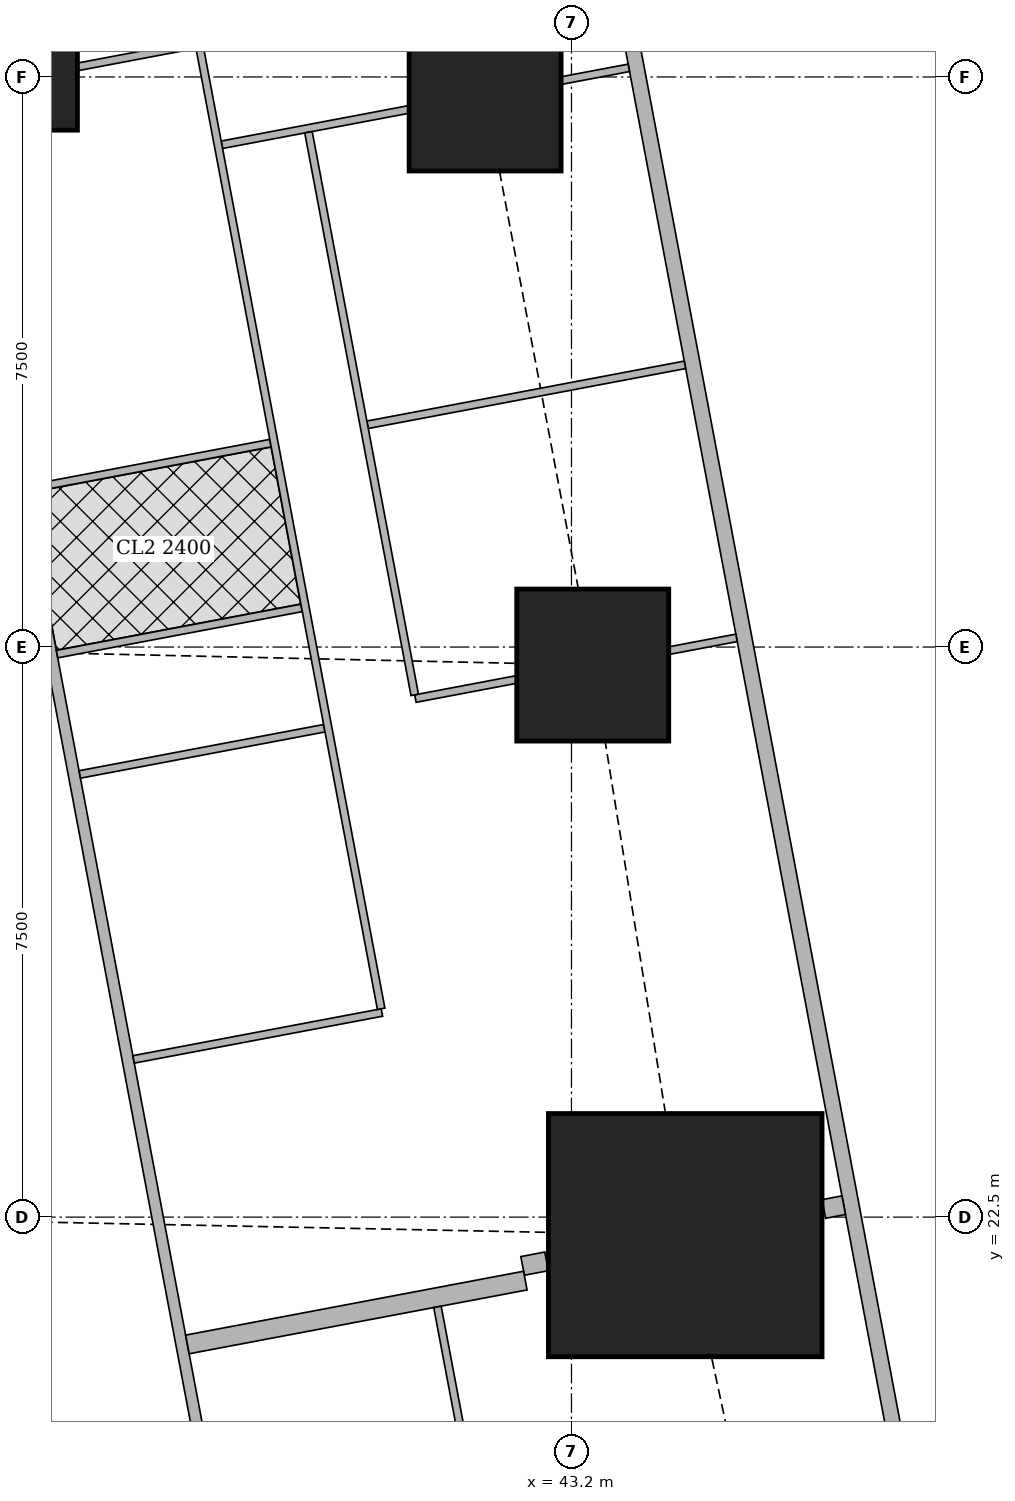
"""IFC4 building model, lengths in metres.
Left out: names, types, materials, properties, quantities, classifications, styles, units other than length and angle.
Written with IfcOpenShell. Run it as: python <this file> out.ifc"""

import sys

from ifc_helpers import new_model, si_unit, direction, frame, frame_2d, origin, origin_2d, place, context, subcontext, project, spatial, rectangle, extrude, element, fill, save


model = new_model("IFC4")
c1 = context("Model", 3, precision=1e-05, world=origin(), true_north=direction((0.0, 1.0)))
c2 = subcontext(c1, "Body", "Model", "MODEL_VIEW")
j1 = project(units=[si_unit("LENGTHUNIT", "METRE"), si_unit("PLANEANGLEUNIT", "RADIAN")], contexts=[c1])
p1 = place(None, origin())
s1 = spatial("IfcSite", under=j1, at=p1, CompositionType="ELEMENT")
p2 = place(p1, origin())
s2 = spatial("IfcBuilding", under=s1, at=p2, CompositionType="ELEMENT")
p3 = place(p2, frame((0.0, 0.0, 285.35)))
s3 = spatial("IfcBuildingStorey", under=s2, at=p3, CompositionType="ELEMENT", Elevation=285.35)
p4 = place(p3, frame((44.697, 22.263, 0.0), z_axis=(0.0, 0.0, 1.0), x_axis=(1.0, 0.0, 0.0)))
e1 = element("IfcColumn", 1, at=p4, inside=s3, PredefinedType="COLUMN", context=c2, shape_type="SweptSolid", body=[
    extrude(rectangle(XDim=3.6, YDim=3.2, at=origin_2d()), origin(), (0.0, 0.0, 1.0), 3.75),
])
p5 = place(p3, frame((43.48, 29.763, 0.0), z_axis=(0.0, 0.0, 1.0), x_axis=(1.0, 0.0, 0.0)))
e2 = element("IfcColumn", 2, at=p5, inside=s3, PredefinedType="COLUMN", context=c2, shape_type="SweptSolid", body=[
    extrude(rectangle(XDim=2.0, YDim=2.0, at=origin_2d()), origin(), (0.0, 0.0, 1.0), 3.75),
])
p6 = place(p3, frame((36.0, 37.5, 0.0), z_axis=(0.0, 0.0, 1.0), x_axis=(1.0, 0.0, 0.0)))
e3 = element("IfcColumn", 3, at=p6, inside=s3, PredefinedType="COLUMN", context=c2, shape_type="SweptSolid", body=[
    extrude(rectangle(XDim=1.4, YDim=1.4, at=origin_2d()), origin(), (0.0, 0.0, 1.0), 3.75),
])
p7 = place(p3, frame((42.064, 37.263, 0.0), z_axis=(0.0, 0.0, 1.0), x_axis=(1.0, 0.0, 0.0)))
e4 = element("IfcColumn", 4, at=p7, inside=s3, PredefinedType="COLUMN", context=c2, shape_type="SweptSolid", body=[
    extrude(rectangle(XDim=2.0, YDim=2.0, at=origin_2d()), origin(), (0.0, 0.0, 1.0), 3.75),
])
p8 = place(p3, frame((49.684, 7.832, 0.0), z_axis=(0.0, 0.0, 1.0), x_axis=(-0.185616669694, 0.982622232565, 0.0)))
e5 = element("IfcWall", 5, at=p8, inside=s3, PredefinedType="SOLIDWALL", context=c2, shape_type="SweptSolid", body=[
    extrude(rectangle(XDim=36.0, YDim=0.2, at=frame_2d((18.0, 0.0))), origin(), (0.0, 0.0, 1.0), 3.5),
])
p9 = place(p8, frame((2.518, 0.0, 0.9)))
e6 = element("IfcOpeningElement", 6, at=p9, cuts=e5, PredefinedType="OPENING", context=c2, shape_type="SweptSolid", body=[
    extrude(rectangle(XDim=2.4, YDim=1.5, at=frame_2d((1.2, 0.75))), frame((0.0, 0.11, 0.0), z_axis=(0.0, -1.0, 0.0), x_axis=(1.0, 0.0, 0.0)), (0.0, 0.0, 1.0), 0.22),
])
p10 = place(p8, frame((8.444, 0.0, 0.9)))
e7 = element("IfcOpeningElement", 7, at=p10, cuts=e5, PredefinedType="OPENING", context=c2, shape_type="SweptSolid", body=[
    extrude(rectangle(XDim=1.8, YDim=1.5, at=frame_2d((0.9, 0.75))), frame((0.0, 0.11, 0.0), z_axis=(0.0, -1.0, 0.0), x_axis=(1.0, 0.0, 0.0)), (0.0, 0.0, 1.0), 0.22),
])
p11 = place(p8, frame((12.261, 0.0, 0.9)))
e8 = element("IfcOpeningElement", 8, at=p11, cuts=e5, PredefinedType="OPENING", context=c2, shape_type="SweptSolid", body=[
    extrude(rectangle(XDim=1.8, YDim=1.5, at=frame_2d((0.9, 0.75))), frame((0.0, 0.11, 0.0), z_axis=(0.0, -1.0, 0.0), x_axis=(1.0, 0.0, 0.0)), (0.0, 0.0, 1.0), 0.22),
])
p12 = place(p8, frame((16.078, 0.0, 0.9)))
e9 = element("IfcOpeningElement", 9, at=p12, cuts=e5, PredefinedType="OPENING", context=c2, shape_type="SweptSolid", body=[
    extrude(rectangle(XDim=1.8, YDim=1.5, at=frame_2d((0.9, 0.75))), frame((0.0, 0.11, 0.0), z_axis=(0.0, -1.0, 0.0), x_axis=(1.0, 0.0, 0.0)), (0.0, 0.0, 1.0), 0.22),
])
p13 = place(p8, frame((19.894, 0.0, 0.9)))
e10 = element("IfcOpeningElement", 10, at=p13, cuts=e5, PredefinedType="OPENING", context=c2, shape_type="SweptSolid", body=[
    extrude(rectangle(XDim=1.8, YDim=1.5, at=frame_2d((0.9, 0.75))), frame((0.0, 0.11, 0.0), z_axis=(0.0, -1.0, 0.0), x_axis=(1.0, 0.0, 0.0)), (0.0, 0.0, 1.0), 0.22),
])
p14 = place(p8, frame((23.71, 0.0, 0.9)))
e11 = element("IfcOpeningElement", 11, at=p14, cuts=e5, PredefinedType="OPENING", context=c2, shape_type="SweptSolid", body=[
    extrude(rectangle(XDim=1.8, YDim=1.5, at=frame_2d((0.9, 0.75))), frame((0.0, 0.11, 0.0), z_axis=(0.0, -1.0, 0.0), x_axis=(1.0, 0.0, 0.0)), (0.0, 0.0, 1.0), 0.22),
])
p15 = place(p8, frame((27.526, 0.0, 0.9)))
e12 = element("IfcOpeningElement", 12, at=p15, cuts=e5, PredefinedType="OPENING", context=c2, shape_type="SweptSolid", body=[
    extrude(rectangle(XDim=1.8, YDim=1.5, at=frame_2d((0.9, 0.75))), frame((0.0, 0.11, 0.0), z_axis=(0.0, -1.0, 0.0), x_axis=(1.0, 0.0, 0.0)), (0.0, 0.0, 1.0), 0.22),
])
p16 = place(p8, frame((32.046, 0.0, 0.9)))
e13 = element("IfcOpeningElement", 13, at=p16, cuts=e5, PredefinedType="OPENING", context=c2, shape_type="SweptSolid", body=[
    extrude(rectangle(XDim=1.8, YDim=1.5, at=frame_2d((0.9, 0.75))), frame((0.0, 0.11, 0.0), z_axis=(0.0, -1.0, 0.0), x_axis=(1.0, 0.0, 0.0)), (0.0, 0.0, 1.0), 0.22),
])
p17 = place(p3, frame((34.036, 42.186, 0.0), z_axis=(0.0, 0.0, 1.0), x_axis=(0.185593518645, -0.9826266055, 0.0)))
e14 = element("IfcWall", 14, at=p17, inside=s3, PredefinedType="SOLIDWALL", context=c2, shape_type="SweptSolid", body=[
    extrude(rectangle(XDim=35.961, YDim=0.15, at=frame_2d((17.98, 0.0))), origin(), (0.0, 0.0, 1.0), 2.5),
])
p18 = place(p17, frame((19.345, 0.0, 0.0)))
e15 = element("IfcOpeningElement", 15, at=p18, cuts=e14, PredefinedType="OPENING", context=c2, shape_type="SweptSolid", body=[
    extrude(rectangle(XDim=1.0, YDim=2.1, at=frame_2d((0.5, 1.05))), frame((0.0, 0.085, 0.0), z_axis=(0.0, -1.0, 0.0), x_axis=(1.0, 0.0, 0.0)), (0.0, 0.0, 1.0), 0.17),
])
p19 = place(p17, frame((33.774, 0.0, 0.0)))
e16 = element("IfcOpeningElement", 16, at=p19, cuts=e14, PredefinedType="OPENING", context=c2, shape_type="SweptSolid", body=[
    extrude(rectangle(XDim=1.0, YDim=2.1, at=frame_2d((0.5, 1.05))), frame((0.0, 0.085, 0.0), z_axis=(0.0, -1.0, 0.0), x_axis=(1.0, 0.0, 0.0)), (0.0, 0.0, 1.0), 0.17),
])
p20 = place(p3, frame((43.955, 37.62, 0.0), z_axis=(0.0, 0.0, 1.0), x_axis=(-0.982708424405, -0.18515980288, 0.0)))
e17 = element("IfcWall", 17, at=p20, inside=s3, PredefinedType="PARTITIONING", context=c2, shape_type="SweptSolid", body=[
    extrude(rectangle(XDim=0.897, YDim=0.1, at=frame_2d((0.448, 0.0))), origin(), (0.0, 0.0, 1.0), 3.5),
])
p21 = place(p3, frame((41.054, 37.072, 0.0), z_axis=(0.0, 0.0, 1.0), x_axis=(-0.982579896219, -0.185840650951, 0.0)))
e18 = element("IfcWall", 18, at=p21, inside=s3, PredefinedType="PARTITIONING", context=c2, shape_type="SweptSolid", body=[
    extrude(rectangle(XDim=2.497, YDim=0.1, at=frame_2d((1.249, 0.0))), origin(), (0.0, 0.0, 1.0), 3.5),
])
p22 = place(p21, frame((1.447, 0.0, 0.0)))
e19 = element("IfcOpeningElement", 19, at=p22, cuts=e18, PredefinedType="OPENING", context=c2, shape_type="SweptSolid", body=[
    extrude(rectangle(XDim=0.9, YDim=2.1, at=frame_2d((0.45, 1.05))), frame((0.0, 0.06, 0.0), z_axis=(0.0, -1.0, 0.0), x_axis=(1.0, 0.0, 0.0)), (0.0, 0.0, 1.0), 0.12),
])
p23 = place(p3, frame((44.693, 33.713, 0.0), z_axis=(0.0, 0.0, 1.0), x_axis=(-0.982623519589, -0.185609856287, 0.0)))
e20 = element("IfcWall", 20, at=p23, inside=s3, PredefinedType="PARTITIONING", context=c2, shape_type="SweptSolid", body=[
    extrude(rectangle(XDim=4.25, YDim=0.1, at=frame_2d((2.125, 0.0))), origin(), (0.0, 0.0, 1.0), 2.5),
])
p24 = place(p3, frame((45.372, 30.121, 0.0), z_axis=(0.0, 0.0, 1.0), x_axis=(-0.982547416156, -0.186012297994, 0.0)))
e21 = element("IfcWall", 21, at=p24, inside=s3, PredefinedType="PARTITIONING", context=c2, shape_type="SweptSolid", body=[
    extrude(rectangle(XDim=0.898, YDim=0.1, at=frame_2d((0.449, 0.0))), origin(), (0.0, 0.0, 1.0), 3.5),
])
p25 = place(p3, frame((42.47, 29.572, 0.0), z_axis=(0.0, 0.0, 1.0), x_axis=(-0.982610503289, -0.185678751683, 0.0)))
e22 = element("IfcWall", 22, at=p25, inside=s3, PredefinedType="PARTITIONING", context=c2, shape_type="SweptSolid", body=[
    extrude(rectangle(XDim=1.346, YDim=0.1, at=frame_2d((0.673, 0.0))), origin(), (0.0, 0.0, 1.0), 2.5),
])
p26 = place(p3, frame((38.25, 37.925, 0.0), z_axis=(0.0, 0.0, 1.0), x_axis=(-0.982610209589, -0.185680305934, 0.0)))
e23 = element("IfcWall", 23, at=p26, inside=s3, PredefinedType="PARTITIONING", context=c2, shape_type="SweptSolid", body=[
    extrude(rectangle(XDim=1.567, YDim=0.1, at=frame_2d((0.784, 0.0))), origin(), (0.0, 0.0, 1.0), 3.5),
])
p27 = place(p3, frame((39.24, 32.683, 0.0), z_axis=(0.0, 0.0, 1.0), x_axis=(-0.982607026909, -0.185697147715, 0.0)))
e24 = element("IfcWall", 24, at=p27, inside=s3, PredefinedType="PARTITIONING", context=c2, shape_type="SweptSolid", body=[
    extrude(rectangle(XDim=3.275, YDim=0.1, at=frame_2d((1.637, 0.0))), origin(), (0.0, 0.0, 1.0), 3.5),
])
p28 = place(p3, frame((39.948, 28.932, 0.0), z_axis=(0.0, 0.0, 1.0), x_axis=(-0.982610347627, -0.185679575441, 0.0)))
e25 = element("IfcWall", 25, at=p28, inside=s3, PredefinedType="PARTITIONING", context=c2, shape_type="SweptSolid", body=[
    extrude(rectangle(XDim=3.274, YDim=0.1, at=frame_2d((1.637, 0.0))), origin(), (0.0, 0.0, 1.0), 3.5),
])
p29 = place(p3, frame((40.706, 25.192, 0.0), z_axis=(0.0, 0.0, 1.0), x_axis=(-0.982633623707, -0.185556356831, 0.0)))
e26 = element("IfcWall", 26, at=p29, inside=s3, PredefinedType="PARTITIONING", context=c2, shape_type="SweptSolid", body=[
    extrude(rectangle(XDim=3.325, YDim=0.1, at=frame_2d((1.663, 0.0))), origin(), (0.0, 0.0, 1.0), 3.5),
])
p30 = place(p3, frame((39.649, 30.515, 0.0), z_axis=(0.0, 0.0, 1.0), x_axis=(-0.982610347627, -0.185679575441, 0.0)))
e27 = element("IfcWall", 27, at=p30, inside=s3, PredefinedType="PARTITIONING", context=c2, shape_type="SweptSolid", body=[
    extrude(rectangle(XDim=3.274, YDim=0.1, at=frame_2d((1.637, 0.0))), origin(), (0.0, 0.0, 1.0), 2.5),
])
p31 = place(p3, frame((37.591, 41.685, 0.0), z_axis=(0.0, 0.0, 1.0), x_axis=(0.185541820726, -0.982636368532, 0.0)))
e28 = element("IfcWall", 28, at=p31, inside=s3, PredefinedType="PARTITIONING", context=c2, shape_type="SweptSolid", body=[
    extrude(rectangle(XDim=16.735, YDim=0.1, at=frame_2d((8.367, 0.0))), origin(), (0.0, 0.0, 1.0), 2.5),
])
p32 = place(p31, frame((2.413, 0.0, 0.0)))
e29 = element("IfcOpeningElement", 29, at=p32, cuts=e28, PredefinedType="OPENING", context=c2, shape_type="SweptSolid", body=[
    extrude(rectangle(XDim=0.9, YDim=2.1, at=frame_2d((0.45, 1.05))), frame((0.0, 0.06, 0.0), z_axis=(0.0, -1.0, 0.0), x_axis=(1.0, 0.0, 0.0)), (0.0, 0.0, 1.0), 0.12),
])
p33 = place(p31, frame((6.713, 0.0, 0.0)))
e30 = element("IfcOpeningElement", 30, at=p33, cuts=e28, PredefinedType="OPENING", context=c2, shape_type="SweptSolid", body=[
    extrude(rectangle(XDim=0.9, YDim=2.1, at=frame_2d((0.45, 1.05))), frame((0.0, 0.06, 0.0), z_axis=(0.0, -1.0, 0.0), x_axis=(1.0, 0.0, 0.0)), (0.0, 0.0, 1.0), 0.12),
])
p34 = place(p31, frame((9.805, 0.0, 0.0)))
e31 = element("IfcOpeningElement", 31, at=p34, cuts=e28, PredefinedType="OPENING", context=c2, shape_type="SweptSolid", body=[
    extrude(rectangle(XDim=0.9, YDim=2.1, at=frame_2d((0.45, 1.05))), frame((0.0, 0.06, 0.0), z_axis=(0.0, -1.0, 0.0), x_axis=(1.0, 0.0, 0.0)), (0.0, 0.0, 1.0), 0.12),
])
p35 = place(p31, frame((11.713, 0.0, 0.0)))
e32 = element("IfcOpeningElement", 32, at=p35, cuts=e28, PredefinedType="OPENING", context=c2, shape_type="SweptSolid", body=[
    extrude(rectangle(XDim=0.9, YDim=2.1, at=frame_2d((0.45, 1.05))), frame((0.0, 0.06, 0.0), z_axis=(0.0, -1.0, 0.0), x_axis=(1.0, 0.0, 0.0)), (0.0, 0.0, 1.0), 0.12),
])
p36 = place(p31, frame((14.426, 0.0, 0.0)))
e33 = element("IfcOpeningElement", 33, at=p36, cuts=e28, PredefinedType="OPENING", context=c2, shape_type="SweptSolid", body=[
    extrude(rectangle(XDim=0.9, YDim=2.1, at=frame_2d((0.45, 1.05))), frame((0.0, 0.06, 0.0), z_axis=(0.0, -1.0, 0.0), x_axis=(1.0, 0.0, 0.0)), (0.0, 0.0, 1.0), 0.12),
])
p37 = place(p3, frame((39.74, 36.773, 0.0), z_axis=(0.0, 0.0, 1.0), x_axis=(0.185583825641, -0.982628436216, 0.0)))
e34 = element("IfcWall", 34, at=p37, inside=s3, PredefinedType="PARTITIONING", context=c2, shape_type="SweptSolid", body=[
    extrude(rectangle(XDim=7.533, YDim=0.1, at=frame_2d((3.766, 0.0))), origin(), (0.0, 0.0, 1.0), 2.5),
])
p38 = place(p37, frame((2.726, 0.0, 0.0)))
e35 = element("IfcOpeningElement", 35, at=p38, cuts=e34, PredefinedType="OPENING", context=c2, shape_type="SweptSolid", body=[
    extrude(rectangle(XDim=0.9, YDim=2.1, at=frame_2d((0.45, 1.05))), frame((0.0, 0.06, 0.0), z_axis=(0.0, -1.0, 0.0), x_axis=(1.0, 0.0, 0.0)), (0.0, 0.0, 1.0), 0.12),
])
p39 = place(p37, frame((6.383, 0.0, 0.0)))
e36 = element("IfcOpeningElement", 36, at=p39, cuts=e34, PredefinedType="OPENING", context=c2, shape_type="SweptSolid", body=[
    extrude(rectangle(XDim=0.9, YDim=2.1, at=frame_2d((0.45, 1.05))), frame((0.0, 0.06, 0.0), z_axis=(0.0, -1.0, 0.0), x_axis=(1.0, 0.0, 0.0)), (0.0, 0.0, 1.0), 0.12),
])
p40 = place(p3, frame((46.782, 22.657, 0.0), z_axis=(0.0, 0.0, 1.0), x_axis=(-0.982104607121, -0.188336243648, 0.0)))
e37 = element("IfcWall", 37, at=p40, inside=s3, PredefinedType="SOLIDWALL", context=c2, shape_type="SweptSolid", body=[
    extrude(rectangle(XDim=0.266, YDim=0.25, at=frame_2d((0.133, 0.0))), origin(), (0.0, 0.0, 1.0), 3.5),
])
p41 = place(p3, frame((42.873, 21.918, 0.0), z_axis=(0.0, 0.0, 1.0), x_axis=(-0.982431406936, -0.186624035603, 0.0)))
e38 = element("IfcWall", 38, at=p41, inside=s3, PredefinedType="SOLIDWALL", context=c2, shape_type="SweptSolid", body=[
    extrude(rectangle(XDim=0.322, YDim=0.25, at=frame_2d((0.161, 0.0))), origin(), (0.0, 0.0, 1.0), 2.5),
])
p42 = place(p3, frame((42.593, 21.665, 0.0), z_axis=(0.0, 0.0, 1.0), x_axis=(-0.982612837616, -0.185666398014, 0.0)))
e39 = element("IfcWall", 39, at=p42, inside=s3, PredefinedType="SOLIDWALL", context=c2, shape_type="SweptSolid", body=[
    extrude(rectangle(XDim=4.525, YDim=0.25, at=frame_2d((2.262, 0.0))), origin(), (0.0, 0.0, 1.0), 2.5),
])
p43 = place(p3, frame((41.437, 21.319, 0.0), z_axis=(0.0, 0.0, 1.0), x_axis=(0.185742368638, -0.982598479794, 0.0)))
e40 = element("IfcWall", 40, at=p43, inside=s3, PredefinedType="PARTITIONING", context=c2, shape_type="SweptSolid", body=[
    extrude(rectangle(XDim=5.718, YDim=0.1, at=frame_2d((2.859, 0.0))), origin(), (0.0, 0.0, 1.0), 3.5),
])
p44 = place(p43, frame((1.333, 0.0, 0.0)))
e41 = element("IfcOpeningElement", 41, at=p44, cuts=e40, PredefinedType="OPENING", context=c2, shape_type="SweptSolid", body=[
    extrude(rectangle(XDim=0.9, YDim=2.1, at=frame_2d((0.45, 1.05))), frame((0.0, 0.06, 0.0), z_axis=(0.0, -1.0, 0.0), x_axis=(1.0, 0.0, 0.0)), (0.0, 0.0, 1.0), 0.12),
])
p45 = place(p43, frame((4.664, 0.0, 0.0)))
e42 = element("IfcOpeningElement", 42, at=p45, cuts=e40, PredefinedType="OPENING", context=c2, shape_type="SweptSolid", body=[
    extrude(rectangle(XDim=0.9, YDim=2.1, at=frame_2d((0.45, 1.05))), frame((0.0, 0.06, 0.0), z_axis=(0.0, -1.0, 0.0), x_axis=(1.0, 0.0, 0.0)), (0.0, 0.0, 1.0), 0.12),
])
p46 = place(p11, origin())
e43 = element("IfcWindow", 43, at=p46, inside=s3, PartitioningType="SINGLE_PANEL", PredefinedType="WINDOW", context=c2, shape_type="SweptSolid", body=[
    extrude(rectangle(XDim=1.8, YDim=1.5, at=frame_2d((0.9, 0.75))), frame((0.0, 0.03, 0.0), z_axis=(0.0, -1.0, 0.0), x_axis=(1.0, 0.0, 0.0)), (0.0, 0.0, 1.0), 0.06),
])
fill(e8, e43)
p47 = place(p12, origin())
e44 = element("IfcWindow", 44, at=p47, inside=s3, PartitioningType="SINGLE_PANEL", PredefinedType="WINDOW", context=c2, shape_type="SweptSolid", body=[
    extrude(rectangle(XDim=1.8, YDim=1.5, at=frame_2d((0.9, 0.75))), frame((0.0, 0.03, 0.0), z_axis=(0.0, -1.0, 0.0), x_axis=(1.0, 0.0, 0.0)), (0.0, 0.0, 1.0), 0.06),
])
fill(e9, e44)
p48 = place(p13, origin())
e45 = element("IfcWindow", 45, at=p48, inside=s3, PartitioningType="SINGLE_PANEL", PredefinedType="WINDOW", context=c2, shape_type="SweptSolid", body=[
    extrude(rectangle(XDim=1.8, YDim=1.5, at=frame_2d((0.9, 0.75))), frame((0.0, 0.03, 0.0), z_axis=(0.0, -1.0, 0.0), x_axis=(1.0, 0.0, 0.0)), (0.0, 0.0, 1.0), 0.06),
])
fill(e10, e45)
p49 = place(p14, origin())
e46 = element("IfcWindow", 46, at=p49, inside=s3, PartitioningType="SINGLE_PANEL", PredefinedType="WINDOW", context=c2, shape_type="SweptSolid", body=[
    extrude(rectangle(XDim=1.8, YDim=1.5, at=frame_2d((0.9, 0.75))), frame((0.0, 0.03, 0.0), z_axis=(0.0, -1.0, 0.0), x_axis=(1.0, 0.0, 0.0)), (0.0, 0.0, 1.0), 0.06),
])
fill(e11, e46)
p50 = place(p15, origin())
e47 = element("IfcWindow", 47, at=p50, inside=s3, PartitioningType="SINGLE_PANEL", PredefinedType="WINDOW", context=c2, shape_type="SweptSolid", body=[
    extrude(rectangle(XDim=1.8, YDim=1.5, at=frame_2d((0.9, 0.75))), frame((0.0, 0.03, 0.0), z_axis=(0.0, -1.0, 0.0), x_axis=(1.0, 0.0, 0.0)), (0.0, 0.0, 1.0), 0.06),
])
fill(e12, e47)
p51 = place(p22, origin())
e48 = element("IfcDoor", 48, at=p51, inside=s3, OperationType="SINGLE_SWING_LEFT", PredefinedType="DOOR", context=c2, shape_type="SweptSolid", body=[
    extrude(rectangle(XDim=0.9, YDim=2.1, at=frame_2d((0.45, 1.05))), frame((0.0, 0.025, 0.0), z_axis=(0.0, -1.0, 0.0), x_axis=(1.0, 0.0, 0.0)), (0.0, 0.0, 1.0), 0.05),
])
fill(e19, e48)
p52 = place(p33, origin())
e49 = element("IfcDoor", 49, at=p52, inside=s3, OperationType="SINGLE_SWING_LEFT", PredefinedType="DOOR", context=c2, shape_type="SweptSolid", body=[
    extrude(rectangle(XDim=0.9, YDim=2.1, at=frame_2d((0.45, 1.05))), frame((0.0, 0.025, 0.0), z_axis=(0.0, -1.0, 0.0), x_axis=(1.0, 0.0, 0.0)), (0.0, 0.0, 1.0), 0.05),
])
fill(e30, e49)
p53 = place(p34, origin())
e50 = element("IfcDoor", 50, at=p53, inside=s3, OperationType="SINGLE_SWING_LEFT", PredefinedType="DOOR", context=c2, shape_type="SweptSolid", body=[
    extrude(rectangle(XDim=0.9, YDim=2.1, at=frame_2d((0.45, 1.05))), frame((0.0, 0.025, 0.0), z_axis=(0.0, -1.0, 0.0), x_axis=(1.0, 0.0, 0.0)), (0.0, 0.0, 1.0), 0.05),
])
fill(e31, e50)
p54 = place(p35, origin())
e51 = element("IfcDoor", 51, at=p54, inside=s3, OperationType="SINGLE_SWING_RIGHT", PredefinedType="DOOR", context=c2, shape_type="SweptSolid", body=[
    extrude(rectangle(XDim=0.9, YDim=2.1, at=frame_2d((0.45, 1.05))), frame((0.0, 0.025, 0.0), z_axis=(0.0, -1.0, 0.0), x_axis=(1.0, 0.0, 0.0)), (0.0, 0.0, 1.0), 0.05),
])
fill(e32, e51)
p55 = place(p36, origin())
e52 = element("IfcDoor", 52, at=p55, inside=s3, OperationType="SINGLE_SWING_LEFT", PredefinedType="DOOR", context=c2, shape_type="SweptSolid", body=[
    extrude(rectangle(XDim=0.9, YDim=2.1, at=frame_2d((0.45, 1.05))), frame((0.0, 0.025, 0.0), z_axis=(0.0, -1.0, 0.0), x_axis=(1.0, 0.0, 0.0)), (0.0, 0.0, 1.0), 0.05),
])
fill(e33, e52)
p56 = place(p38, origin())
e53 = element("IfcDoor", 53, at=p56, inside=s3, OperationType="SINGLE_SWING_RIGHT", PredefinedType="DOOR", context=c2, shape_type="SweptSolid", body=[
    extrude(rectangle(XDim=0.9, YDim=2.1, at=frame_2d((0.45, 1.05))), frame((0.0, 0.025, 0.0), z_axis=(0.0, -1.0, 0.0), x_axis=(1.0, 0.0, 0.0)), (0.0, 0.0, 1.0), 0.05),
])
fill(e35, e53)
p57 = place(p39, origin())
e54 = element("IfcDoor", 54, at=p57, inside=s3, OperationType="SINGLE_SWING_RIGHT", PredefinedType="DOOR", context=c2, shape_type="SweptSolid", body=[
    extrude(rectangle(XDim=0.9, YDim=2.1, at=frame_2d((0.45, 1.05))), frame((0.0, 0.025, 0.0), z_axis=(0.0, -1.0, 0.0), x_axis=(1.0, 0.0, 0.0)), (0.0, 0.0, 1.0), 0.05),
])
fill(e36, e54)
p58 = place(p18, origin())
e55 = element("IfcDoor", 55, at=p58, inside=s3, OperationType="SINGLE_SWING_LEFT", PredefinedType="DOOR", context=c2, shape_type="SweptSolid", body=[
    extrude(rectangle(XDim=1.0, YDim=2.1, at=frame_2d((0.5, 1.05))), frame((0.0, 0.025, 0.0), z_axis=(0.0, -1.0, 0.0), x_axis=(1.0, 0.0, 0.0)), (0.0, 0.0, 1.0), 0.05),
])
fill(e15, e55)
p59 = place(p44, origin())
e56 = element("IfcDoor", 56, at=p59, inside=s3, OperationType="SINGLE_SWING_RIGHT", PredefinedType="DOOR", context=c2, shape_type="SweptSolid", body=[
    extrude(rectangle(XDim=0.9, YDim=2.1, at=frame_2d((0.45, 1.05))), frame((0.0, 0.025, 0.0), z_axis=(0.0, -1.0, 0.0), x_axis=(1.0, 0.0, 0.0)), (0.0, 0.0, 1.0), 0.05),
])
fill(e41, e56)
save(model, sys.argv[1])
